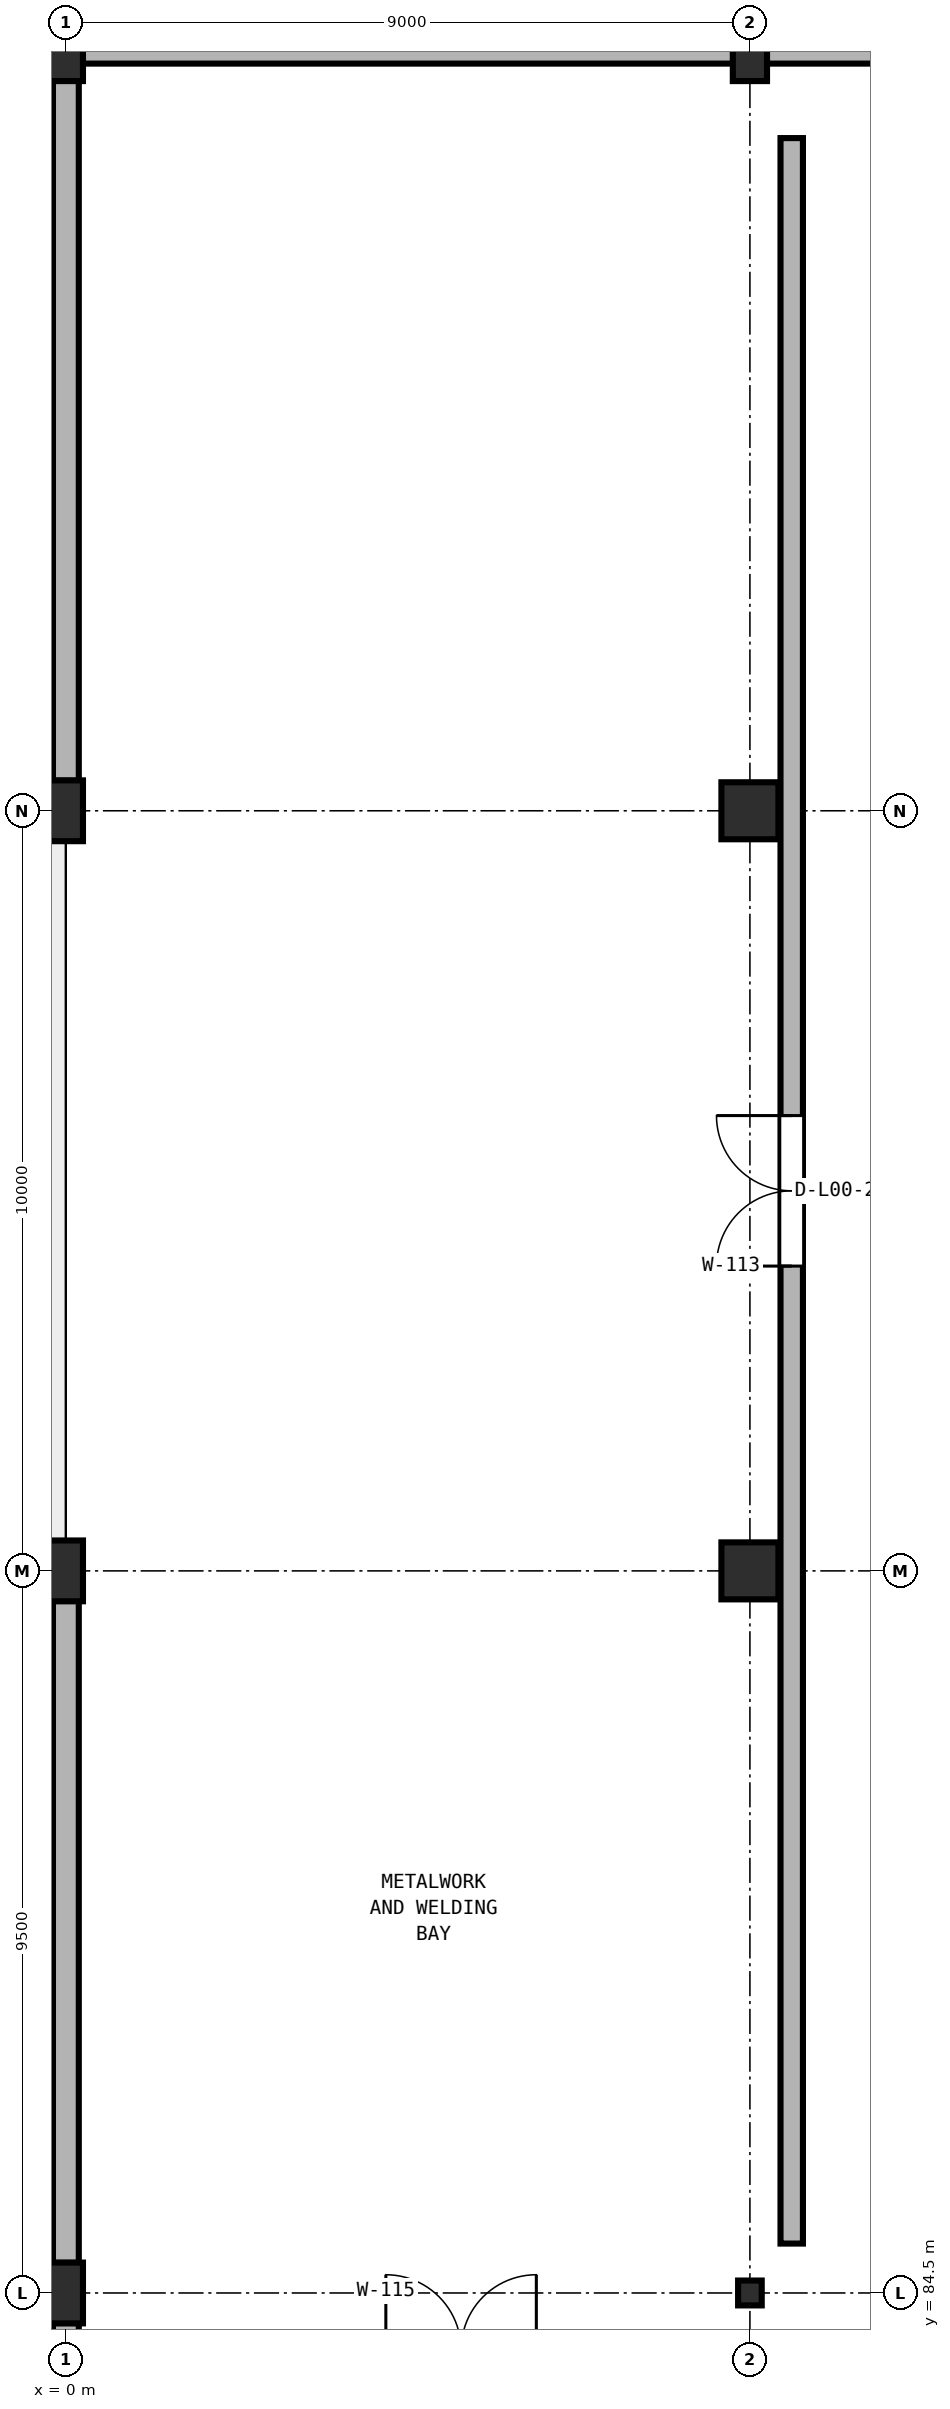
"""IFC4 building model, lengths in metres.
Left out: names, types, materials, properties, quantities, classifications, styles, units other than length and angle.
Written with IfcOpenShell. Run it as: python <this file> out.ifc"""

import sys

from ifc_helpers import new_model, si_unit, direction, frame, frame_2d, origin, origin_2d, place, context, subcontext, project, spatial, rectangle, i_section, extrude, element, fill, save


model = new_model("IFC4")
c1 = context("Model", 3, precision=1e-05, world=origin(), true_north=direction((0.0, 1.0)))
c2 = subcontext(c1, "Body", "Model", "MODEL_VIEW")
j1 = project(units=[si_unit("LENGTHUNIT", "METRE"), si_unit("PLANEANGLEUNIT", "RADIAN")], contexts=[c1])
p1 = place(None, origin())
s1 = spatial("IfcSite", under=j1, at=p1, CompositionType="ELEMENT")
p2 = place(p1, origin())
s2 = spatial("IfcBuilding", under=s1, at=p2, CompositionType="ELEMENT")
p3 = place(p2, origin())
s3 = spatial("IfcBuildingStorey", under=s2, at=p3, CompositionType="ELEMENT", Elevation=0.0)
for number, where, z_axis, x_axis in (
    (1, (0.0, 84.5, 0.0), (0.0, 0.0, 1.0), (1.0, 0.0, 0.0)),
    (2, (0.0, 94.0, 0.0), (0.0, 0.0, 1.0), (1.0, 0.0, 0.0)),
    (3, (0.0, 104.0, 0.0), (0.0, 0.0, 1.0), (1.0, 0.0, 0.0)),
    (4, (0.0, 114.0, 0.0), (0.0, 0.0, 1.0), (1.0, 0.0, 0.0)),
):
    element("IfcColumn", number, at=place(p3, frame(where, z_axis=z_axis, x_axis=x_axis)), inside=s3, PredefinedType="PILASTER", context=c2, shape_type="SweptSolid", body=[
        extrude(rectangle(XDim=0.45, YDim=0.8, at=origin_2d()), origin(), (0.0, 0.0, 1.0), 5.12),
    ])
p4 = place(p3, frame((9.0, 84.5, 0.0), z_axis=(0.0, 0.0, 1.0), x_axis=(1.0, 0.0, 0.0)))
e5 = element("IfcColumn", 5, at=p4, inside=s3, PredefinedType="COLUMN", context=c2, shape_type="SweptSolid", body=[
    extrude(i_section(OverallWidth=0.311, OverallDepth=0.327, WebThickness=0.016, FlangeThickness=0.025, FilletRadius=0.017, at=origin_2d()), origin(), (0.0, 0.0, 1.0), 5.12),
])
for number, where, z_axis, x_axis in (
    (6, (9.0, 94.0, 0.0), (0.0, 0.0, 1.0), (1.0, 0.0, 0.0)),
    (7, (9.0, 104.0, 0.0), (0.0, 0.0, 1.0), (1.0, 0.0, 0.0)),
):
    element("IfcColumn", number, at=place(p3, frame(where, z_axis=z_axis, x_axis=x_axis)), inside=s3, PredefinedType="COLUMN", context=c2, shape_type="SweptSolid", body=[
        extrude(rectangle(XDim=0.75, YDim=0.75, at=origin_2d()), origin(), (0.0, 0.0, 1.0), 5.12),
    ])
p5 = place(p3, frame((9.0, 114.0, 0.0), z_axis=(0.0, 0.0, 1.0), x_axis=(1.0, 0.0, 0.0)))
e8 = element("IfcColumn", 8, at=p5, inside=s3, PredefinedType="PILASTER", context=c2, shape_type="SweptSolid", body=[
    extrude(rectangle(XDim=0.45, YDim=0.8, at=origin_2d()), origin(), (0.0, 0.0, 1.0), 5.12),
])
p6 = place(p3, frame((0.0, 75.396, 0.0), z_axis=(0.0, 0.0, 1.0), x_axis=(0.0, 1.0, 0.0)))
e9 = element("IfcWall", 9, at=p6, inside=s3, PredefinedType="SOLIDWALL", context=c2, shape_type="SweptSolid", body=[
    extrude(rectangle(XDim=8.708, YDim=0.34, at=frame_2d((4.354, 0.0))), origin(), (0.0, 0.0, 1.0), 4.731),
])
p7 = place(p6, frame((3.354, 0.0, 0.0)))
e10 = element("IfcOpeningElement", 10, at=p7, cuts=e9, PredefinedType="OPENING", context=c2, shape_type="SweptSolid", body=[
    extrude(rectangle(XDim=2.0, YDim=2.3, at=frame_2d((1.0, 1.15))), frame((0.0, 0.18, 0.0), z_axis=(0.0, -1.0, 0.0), x_axis=(1.0, 0.0, 0.0)), (0.0, 0.0, 1.0), 0.36),
])
p8 = place(p3, frame((0.0, 84.896, 0.0), z_axis=(0.0, 0.0, 1.0), x_axis=(0.0, 1.0, 0.0)))
e11 = element("IfcWall", 11, at=p8, inside=s3, PredefinedType="SOLIDWALL", context=c2, shape_type="SweptSolid", body=[
    extrude(rectangle(XDim=8.708, YDim=0.34, at=frame_2d((4.354, 0.0))), origin(), (0.0, 0.0, 1.0), 4.731),
])
p9 = place(p3, frame((0.0, 104.396, 0.0), z_axis=(0.0, 0.0, 1.0), x_axis=(0.0, 1.0, 0.0)))
e12 = element("IfcWall", 12, at=p9, inside=s3, PredefinedType="SOLIDWALL", context=c2, shape_type="SweptSolid", body=[
    extrude(rectangle(XDim=9.208, YDim=0.34, at=frame_2d((4.604, 0.0))), origin(), (0.0, 0.0, 1.0), 4.731),
])
for number, where, z_axis, x_axis in (
    (13, (0.221, 114.0, 0.0), (0.0, 0.0, 1.0), (1.0, 0.0, 0.0)),
    (14, (9.221, 114.0, 0.0), (0.0, 0.0, 1.0), (1.0, 0.0, 0.0)),
):
    element("IfcWall", number, at=place(p3, frame(where, z_axis=z_axis, x_axis=x_axis)), inside=s3, PredefinedType="SOLIDWALL", context=c2, shape_type="SweptSolid", body=[
        extrude(rectangle(XDim=8.558, YDim=0.34, at=frame_2d((4.279, 0.0))), origin(), (0.0, 0.0, 1.0), 4.731),
    ])
p10 = place(p3, frame((9.55, 85.15, 0.0), z_axis=(0.0, 0.0, 1.0), x_axis=(0.0, 1.0, 0.0)))
e15 = element("IfcWall", 15, at=p10, inside=s3, PredefinedType="PARTITIONING", context=c2, shape_type="SweptSolid", body=[
    extrude(rectangle(XDim=27.7, YDim=0.295, at=frame_2d((13.85, 0.0))), origin(), (0.0, 0.0, 1.0), 5.07),
])
p11 = place(p10, frame((12.86, 0.0, 0.0)))
e16 = element("IfcOpeningElement", 16, at=p11, cuts=e15, PredefinedType="OPENING", context=c2, shape_type="SweptSolid", body=[
    extrude(rectangle(XDim=1.98, YDim=2.42, at=frame_2d((0.99, 1.21))), frame((0.0, 0.157, 0.0), z_axis=(0.0, -1.0, 0.0), x_axis=(1.0, 0.0, 0.0)), (0.0, 0.0, 1.0), 0.315),
])
p12 = place(p11, origin())
e17 = element("IfcDoor", 17, at=p12, inside=s3, OperationType="DOUBLE_DOOR_SINGLE_SWING", PredefinedType="DOOR", context=c2, shape_type="SweptSolid", body=[
    extrude(rectangle(XDim=1.98, YDim=2.42, at=frame_2d((0.99, 1.21))), frame((0.0, 0.025, 0.0), z_axis=(0.0, -1.0, 0.0), x_axis=(1.0, 0.0, 0.0)), (0.0, 0.0, 1.0), 0.05),
])
fill(e16, e17)
save(model, sys.argv[1])
